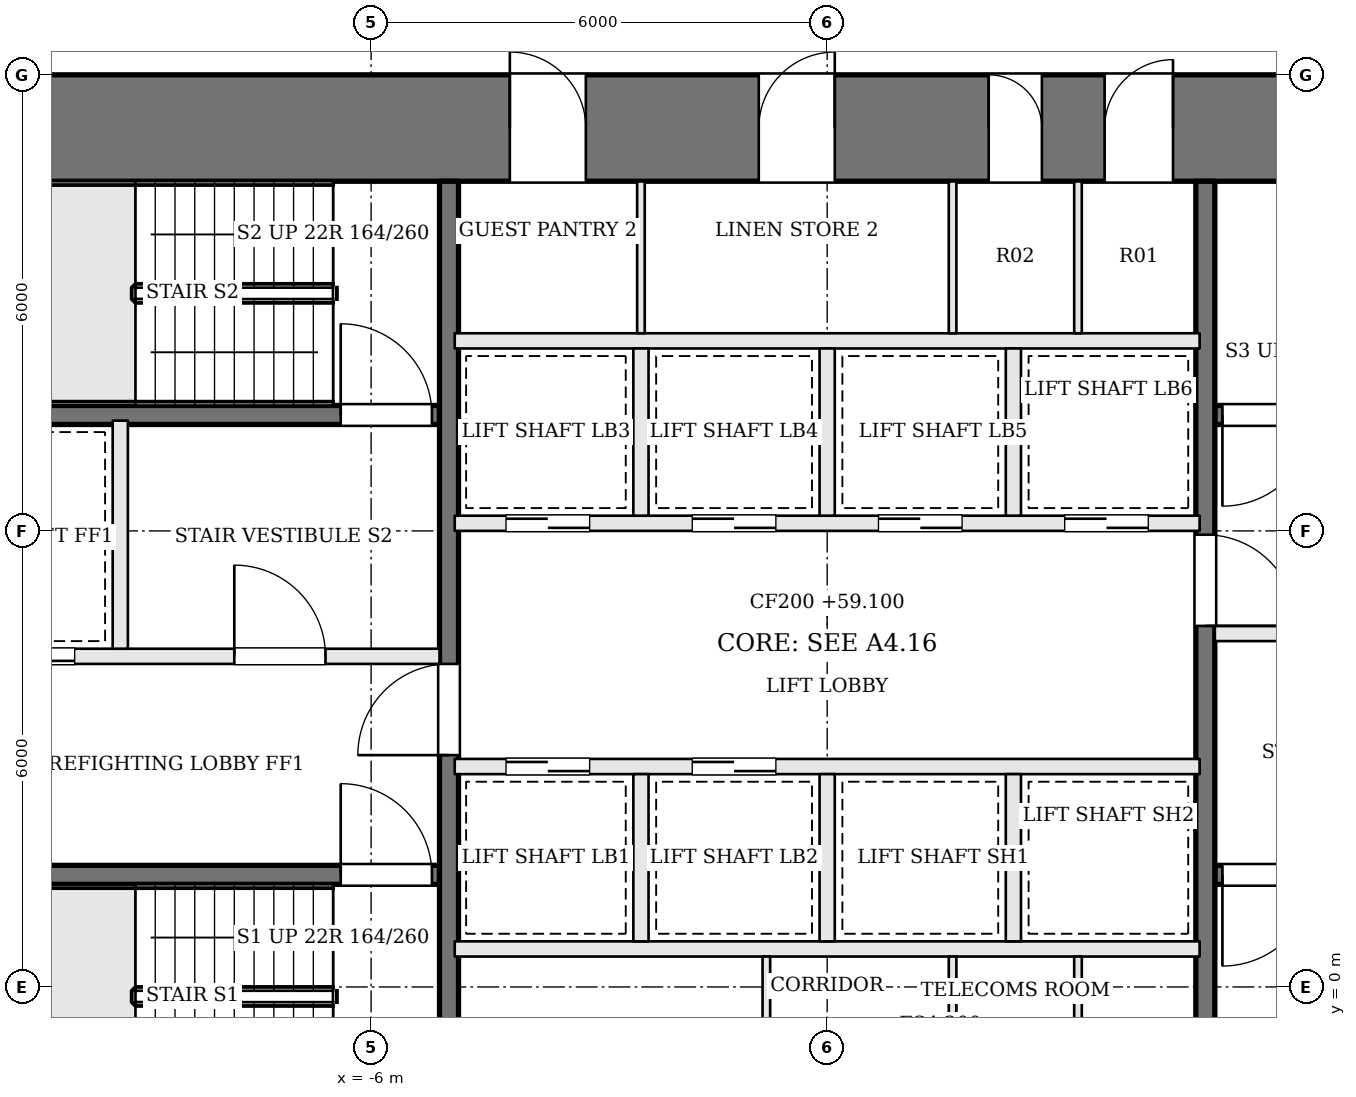
"""IFC4 building model, lengths in metres.
Left out: names, types, materials, properties, quantities, classifications, styles, units other than length and angle.
Written with IfcOpenShell. Run it as: python <this file> out.ifc"""

import sys

from ifc_helpers import new_model, si_unit, direction, frame, frame_2d, origin, place, context, subcontext, project, spatial, rectangle, extrude, element, fill, save


model = new_model("IFC4")
c1 = context("Model", 3, precision=1e-05, world=origin(), true_north=direction((0.0, 1.0)))
c2 = subcontext(c1, "Body", "Model", "MODEL_VIEW")
j1 = project(units=[si_unit("LENGTHUNIT", "METRE"), si_unit("PLANEANGLEUNIT", "RADIAN")], contexts=[c1])
p1 = place(None, origin())
s1 = spatial("IfcSite", under=j1, at=p1, CompositionType="ELEMENT")
p2 = place(p1, origin())
s2 = spatial("IfcBuilding", under=s1, at=p2, CompositionType="ELEMENT")
p3 = place(p2, frame((0.0, 0.0, 59.1)))
s3 = spatial("IfcBuildingStorey", under=s2, at=p3, CompositionType="ELEMENT", Elevation=59.1)
p4 = place(p3, frame((-13.0, 11.3, 0.0), z_axis=(0.0, 0.0, 1.0), x_axis=(1.0, 0.0, 0.0)))
e1 = element("IfcWall", 1, at=p4, inside=s3, PredefinedType="SHEAR", context=c2, shape_type="SweptSolid", body=[
    extrude(rectangle(XDim=26.0, YDim=1.4, at=frame_2d((13.0, 0.0))), origin(), (0.0, 0.0, 1.0), 3.6),
])
p5 = place(p4, frame((8.825, 0.0, 0.0)))
e2 = element("IfcOpeningElement", 2, at=p5, cuts=e1, PredefinedType="OPENING", context=c2, shape_type="SweptSolid", body=[
    extrude(rectangle(XDim=1.0, YDim=2.1, at=frame_2d((0.5, 1.05))), frame((0.0, 0.71, 0.0), z_axis=(0.0, -1.0, 0.0), x_axis=(1.0, 0.0, 0.0)), (0.0, 0.0, 1.0), 1.42),
])
p6 = place(p4, frame((12.1, 0.0, 0.0)))
e3 = element("IfcOpeningElement", 3, at=p6, cuts=e1, PredefinedType="OPENING", context=c2, shape_type="SweptSolid", body=[
    extrude(rectangle(XDim=1.0, YDim=2.1, at=frame_2d((0.5, 1.05))), frame((0.0, 0.71, 0.0), z_axis=(0.0, -1.0, 0.0), x_axis=(1.0, 0.0, 0.0)), (0.0, 0.0, 1.0), 1.42),
])
p7 = place(p4, frame((15.125, 0.0, 0.0)))
e4 = element("IfcOpeningElement", 4, at=p7, cuts=e1, PredefinedType="OPENING", context=c2, shape_type="SweptSolid", body=[
    extrude(rectangle(XDim=0.7, YDim=2.1, at=frame_2d((0.35, 1.05))), frame((0.0, 0.71, 0.0), z_axis=(0.0, -1.0, 0.0), x_axis=(1.0, 0.0, 0.0)), (0.0, 0.0, 1.0), 1.42),
])
p8 = place(p4, frame((16.65, 0.0, 0.0)))
e5 = element("IfcOpeningElement", 5, at=p8, cuts=e1, PredefinedType="OPENING", context=c2, shape_type="SweptSolid", body=[
    extrude(rectangle(XDim=0.9, YDim=2.1, at=frame_2d((0.45, 1.05))), frame((0.0, 0.71, 0.0), z_axis=(0.0, -1.0, 0.0), x_axis=(1.0, 0.0, 0.0)), (0.0, 0.0, 1.0), 1.42),
])
p9 = place(p3, frame((-11.6, 1.475, 0.0), z_axis=(0.0, 0.0, 1.0), x_axis=(1.0, 0.0, 0.0)))
e6 = element("IfcWall", 6, at=p9, inside=s3, PredefinedType="SOLIDWALL", context=c2, shape_type="SweptSolid", body=[
    extrude(rectangle(XDim=6.5, YDim=0.25, at=frame_2d((3.25, 0.0))), origin(), (0.0, 0.0, 1.0), 3.4),
])
p10 = place(p9, frame((5.2, 0.0, 0.0)))
e7 = element("IfcOpeningElement", 7, at=p10, cuts=e6, PredefinedType="OPENING", context=c2, shape_type="SweptSolid", body=[
    extrude(rectangle(XDim=1.2, YDim=2.1, at=frame_2d((0.6, 1.05))), frame((0.0, 0.135, 0.0), z_axis=(0.0, -1.0, 0.0), x_axis=(1.0, 0.0, 0.0)), (0.0, 0.0, 1.0), 0.27),
])
p11 = place(p3, frame((11.6, 7.525, 0.0), z_axis=(0.0, 0.0, 1.0), x_axis=(-1.0, 0.0, 0.0)))
e8 = element("IfcWall", 8, at=p11, inside=s3, PredefinedType="SOLIDWALL", context=c2, shape_type="SweptSolid", body=[
    extrude(rectangle(XDim=6.5, YDim=0.25, at=frame_2d((3.25, 0.0))), origin(), (0.0, 0.0, 1.0), 3.4),
])
p12 = place(p11, frame((5.2, 0.0, 0.0)))
e9 = element("IfcOpeningElement", 9, at=p12, cuts=e8, PredefinedType="OPENING", context=c2, shape_type="SweptSolid", body=[
    extrude(rectangle(XDim=1.2, YDim=2.1, at=frame_2d((0.6, 1.05))), frame((0.0, 0.135, 0.0), z_axis=(0.0, -1.0, 0.0), x_axis=(1.0, 0.0, 0.0)), (0.0, 0.0, 1.0), 0.27),
])
p13 = place(p3, frame((-11.6, 4.35, 0.0), z_axis=(0.0, 0.0, 1.0), x_axis=(1.0, 0.0, 0.0)))
e10 = element("IfcWall", 10, at=p13, inside=s3, PredefinedType="SOLIDWALL", context=c2, shape_type="SweptSolid", body=[
    extrude(rectangle(XDim=6.5, YDim=0.2, at=frame_2d((3.25, 0.0))), origin(), (0.0, 0.0, 1.0), 3.4),
])
p14 = place(p13, frame((3.8, 0.0, 0.0)))
e11 = element("IfcOpeningElement", 11, at=p14, cuts=e10, PredefinedType="OPENING", context=c2, shape_type="SweptSolid", body=[
    extrude(rectangle(XDim=1.2, YDim=2.1, at=frame_2d((0.6, 1.05))), frame((0.0, 0.11, 0.0), z_axis=(0.0, -1.0, 0.0), x_axis=(1.0, 0.0, 0.0)), (0.0, 0.0, 1.0), 0.22),
])
p15 = place(p13, frame((0.5, 0.0, 0.0)))
e12 = element("IfcOpeningElement", 12, at=p15, cuts=e10, PredefinedType="OPENING", context=c2, shape_type="SweptSolid", body=[
    extrude(rectangle(XDim=1.2, YDim=2.1, at=frame_2d((0.6, 1.05))), frame((0.0, 0.11, 0.0), z_axis=(0.0, -1.0, 0.0), x_axis=(1.0, 0.0, 0.0)), (0.0, 0.0, 1.0), 0.22),
])
p16 = place(p3, frame((11.6, 4.65, 0.0), z_axis=(0.0, 0.0, 1.0), x_axis=(-1.0, 0.0, 0.0)))
e13 = element("IfcWall", 13, at=p16, inside=s3, PredefinedType="SOLIDWALL", context=c2, shape_type="SweptSolid", body=[
    extrude(rectangle(XDim=6.5, YDim=0.2, at=frame_2d((3.25, 0.0))), origin(), (0.0, 0.0, 1.0), 3.4),
])
p17 = place(p16, frame((3.8, 0.0, 0.0)))
e14 = element("IfcOpeningElement", 14, at=p17, cuts=e13, PredefinedType="OPENING", context=c2, shape_type="SweptSolid", body=[
    extrude(rectangle(XDim=1.2, YDim=2.1, at=frame_2d((0.6, 1.05))), frame((0.0, 0.11, 0.0), z_axis=(0.0, -1.0, 0.0), x_axis=(1.0, 0.0, 0.0)), (0.0, 0.0, 1.0), 0.22),
])
p18 = place(p16, frame((0.5, 0.0, 0.0)))
e15 = element("IfcOpeningElement", 15, at=p18, cuts=e13, PredefinedType="OPENING", context=c2, shape_type="SweptSolid", body=[
    extrude(rectangle(XDim=1.2, YDim=2.1, at=frame_2d((0.6, 1.05))), frame((0.0, 0.11, 0.0), z_axis=(0.0, -1.0, 0.0), x_axis=(1.0, 0.0, 0.0)), (0.0, 0.0, 1.0), 0.22),
])
p19 = place(p3, frame((-11.6, 7.525, 0.0), z_axis=(0.0, 0.0, 1.0), x_axis=(1.0, 0.0, 0.0)))
e16 = element("IfcWall", 16, at=p19, inside=s3, PredefinedType="SOLIDWALL", context=c2, shape_type="SweptSolid", body=[
    extrude(rectangle(XDim=6.5, YDim=0.25, at=frame_2d((3.25, 0.0))), origin(), (0.0, 0.0, 1.0), 3.4),
])
p20 = place(p19, frame((5.2, 0.0, 0.0)))
e17 = element("IfcOpeningElement", 17, at=p20, cuts=e16, PredefinedType="OPENING", context=c2, shape_type="SweptSolid", body=[
    extrude(rectangle(XDim=1.2, YDim=2.1, at=frame_2d((0.6, 1.05))), frame((0.0, 0.135, 0.0), z_axis=(0.0, -1.0, 0.0), x_axis=(1.0, 0.0, 0.0)), (0.0, 0.0, 1.0), 0.27),
])
p21 = place(p3, frame((11.6, 1.475, 0.0), z_axis=(0.0, 0.0, 1.0), x_axis=(-1.0, 0.0, 0.0)))
e18 = element("IfcWall", 18, at=p21, inside=s3, PredefinedType="SOLIDWALL", context=c2, shape_type="SweptSolid", body=[
    extrude(rectangle(XDim=6.5, YDim=0.25, at=frame_2d((3.25, 0.0))), origin(), (0.0, 0.0, 1.0), 3.4),
])
p22 = place(p21, frame((5.2, 0.0, 0.0)))
e19 = element("IfcOpeningElement", 19, at=p22, cuts=e18, PredefinedType="OPENING", context=c2, shape_type="SweptSolid", body=[
    extrude(rectangle(XDim=1.2, YDim=2.1, at=frame_2d((0.6, 1.05))), frame((0.0, 0.135, 0.0), z_axis=(0.0, -1.0, 0.0), x_axis=(1.0, 0.0, 0.0)), (0.0, 0.0, 1.0), 0.27),
])
p23 = place(p3, frame((-9.3, 4.45, 0.0), z_axis=(0.0, 0.0, 1.0), x_axis=(0.0, 1.0, 0.0)))
e20 = element("IfcWall", 20, at=p23, inside=s3, PredefinedType="SOLIDWALL", context=c2, shape_type="SweptSolid", body=[
    extrude(rectangle(XDim=3.0, YDim=0.2, at=frame_2d((1.5, 0.0))), origin(), (0.0, 0.0, 1.0), 3.4),
])
p24 = place(p3, frame((-4.975, -1.6, 0.0), z_axis=(0.0, 0.0, 1.0), x_axis=(0.0, 1.0, 0.0)))
e21 = element("IfcWall", 21, at=p24, inside=s3, PredefinedType="SOLIDWALL", context=c2, shape_type="SweptSolid", body=[
    extrude(rectangle(XDim=12.2, YDim=0.25, at=frame_2d((6.1, 0.0))), origin(), (0.0, 0.0, 1.0), 3.4),
])
p25 = place(p24, frame((4.65, 0.0, 0.0)))
e22 = element("IfcOpeningElement", 22, at=p25, cuts=e21, PredefinedType="OPENING", context=c2, shape_type="SweptSolid", body=[
    extrude(rectangle(XDim=1.2, YDim=2.1, at=frame_2d((0.6, 1.05))), frame((0.0, 0.135, 0.0), z_axis=(0.0, -1.0, 0.0), x_axis=(1.0, 0.0, 0.0)), (0.0, 0.0, 1.0), 0.27),
])
p26 = place(p3, frame((4.975, 10.6, 0.0), z_axis=(0.0, 0.0, 1.0), x_axis=(0.0, -1.0, 0.0)))
e23 = element("IfcWall", 23, at=p26, inside=s3, PredefinedType="SOLIDWALL", context=c2, shape_type="SweptSolid", body=[
    extrude(rectangle(XDim=12.2, YDim=0.25, at=frame_2d((6.1, 0.0))), origin(), (0.0, 0.0, 1.0), 3.4),
])
p27 = place(p26, frame((4.65, 0.0, 0.0)))
e24 = element("IfcOpeningElement", 24, at=p27, cuts=e23, PredefinedType="OPENING", context=c2, shape_type="SweptSolid", body=[
    extrude(rectangle(XDim=1.2, YDim=2.1, at=frame_2d((0.6, 1.05))), frame((0.0, 0.135, 0.0), z_axis=(0.0, -1.0, 0.0), x_axis=(1.0, 0.0, 0.0)), (0.0, 0.0, 1.0), 0.27),
])
p28 = place(p3, frame((-4.9, 0.5, 0.0), z_axis=(0.0, 0.0, 1.0), x_axis=(1.0, 0.0, 0.0)))
e25 = element("IfcWall", 25, at=p28, inside=s3, PredefinedType="SOLIDWALL", context=c2, shape_type="SweptSolid", body=[
    extrude(rectangle(XDim=9.8, YDim=0.2, at=frame_2d((4.9, 0.0))), origin(), (0.0, 0.0, 1.0), 3.4),
])
p29 = place(p3, frame((-4.9, 2.9, 0.0), z_axis=(0.0, 0.0, 1.0), x_axis=(1.0, 0.0, 0.0)))
e26 = element("IfcWall", 26, at=p29, inside=s3, PredefinedType="SOLIDWALL", context=c2, shape_type="SweptSolid", body=[
    extrude(rectangle(XDim=9.8, YDim=0.2, at=frame_2d((4.9, 0.0))), origin(), (0.0, 0.0, 1.0), 3.4),
])
p30 = place(p29, frame((0.675, 0.0, 0.0)))
e27 = element("IfcOpeningElement", 27, at=p30, cuts=e26, PredefinedType="OPENING", context=c2, shape_type="SweptSolid", body=[
    extrude(rectangle(XDim=1.1, YDim=2.1, at=frame_2d((0.55, 1.05))), frame((0.0, 0.11, 0.0), z_axis=(0.0, -1.0, 0.0), x_axis=(1.0, 0.0, 0.0)), (0.0, 0.0, 1.0), 0.22),
])
p31 = place(p29, frame((3.125, 0.0, 0.0)))
e28 = element("IfcOpeningElement", 28, at=p31, cuts=e26, PredefinedType="OPENING", context=c2, shape_type="SweptSolid", body=[
    extrude(rectangle(XDim=1.1, YDim=2.1, at=frame_2d((0.55, 1.05))), frame((0.0, 0.11, 0.0), z_axis=(0.0, -1.0, 0.0), x_axis=(1.0, 0.0, 0.0)), (0.0, 0.0, 1.0), 0.22),
])
p32 = place(p3, frame((-4.9, 6.1, 0.0), z_axis=(0.0, 0.0, 1.0), x_axis=(1.0, 0.0, 0.0)))
e29 = element("IfcWall", 29, at=p32, inside=s3, PredefinedType="SOLIDWALL", context=c2, shape_type="SweptSolid", body=[
    extrude(rectangle(XDim=9.8, YDim=0.2, at=frame_2d((4.9, 0.0))), origin(), (0.0, 0.0, 1.0), 3.4),
])
p33 = place(p32, frame((0.675, 0.0, 0.0)))
e30 = element("IfcOpeningElement", 30, at=p33, cuts=e29, PredefinedType="OPENING", context=c2, shape_type="SweptSolid", body=[
    extrude(rectangle(XDim=1.1, YDim=2.1, at=frame_2d((0.55, 1.05))), frame((0.0, 0.11, 0.0), z_axis=(0.0, -1.0, 0.0), x_axis=(1.0, 0.0, 0.0)), (0.0, 0.0, 1.0), 0.22),
])
p34 = place(p32, frame((3.125, 0.0, 0.0)))
e31 = element("IfcOpeningElement", 31, at=p34, cuts=e29, PredefinedType="OPENING", context=c2, shape_type="SweptSolid", body=[
    extrude(rectangle(XDim=1.1, YDim=2.1, at=frame_2d((0.55, 1.05))), frame((0.0, 0.11, 0.0), z_axis=(0.0, -1.0, 0.0), x_axis=(1.0, 0.0, 0.0)), (0.0, 0.0, 1.0), 0.22),
])
p35 = place(p32, frame((5.575, 0.0, 0.0)))
e32 = element("IfcOpeningElement", 32, at=p35, cuts=e29, PredefinedType="OPENING", context=c2, shape_type="SweptSolid", body=[
    extrude(rectangle(XDim=1.1, YDim=2.1, at=frame_2d((0.55, 1.05))), frame((0.0, 0.11, 0.0), z_axis=(0.0, -1.0, 0.0), x_axis=(1.0, 0.0, 0.0)), (0.0, 0.0, 1.0), 0.22),
])
p36 = place(p32, frame((8.025, 0.0, 0.0)))
e33 = element("IfcOpeningElement", 33, at=p36, cuts=e29, PredefinedType="OPENING", context=c2, shape_type="SweptSolid", body=[
    extrude(rectangle(XDim=1.1, YDim=2.1, at=frame_2d((0.55, 1.05))), frame((0.0, 0.11, 0.0), z_axis=(0.0, -1.0, 0.0), x_axis=(1.0, 0.0, 0.0)), (0.0, 0.0, 1.0), 0.22),
])
p37 = place(p3, frame((-4.9, 8.5, 0.0), z_axis=(0.0, 0.0, 1.0), x_axis=(1.0, 0.0, 0.0)))
e34 = element("IfcWall", 34, at=p37, inside=s3, PredefinedType="SOLIDWALL", context=c2, shape_type="SweptSolid", body=[
    extrude(rectangle(XDim=9.8, YDim=0.2, at=frame_2d((4.9, 0.0))), origin(), (0.0, 0.0, 1.0), 3.4),
])
for number, where, z_axis, x_axis in (
    (35, (-2.45, 0.6, 0.0), (0.0, 0.0, 1.0), (0.0, 1.0, 0.0)),
    (36, (0.0, 0.6, 0.0), (0.0, 0.0, 1.0), (0.0, 1.0, 0.0)),
    (37, (2.45, 0.6, 0.0), (0.0, 0.0, 1.0), (0.0, 1.0, 0.0)),
    (38, (-2.45, 6.2, 0.0), (0.0, 0.0, 1.0), (0.0, 1.0, 0.0)),
    (39, (0.0, 6.2, 0.0), (0.0, 0.0, 1.0), (0.0, 1.0, 0.0)),
    (40, (2.45, 6.2, 0.0), (0.0, 0.0, 1.0), (0.0, 1.0, 0.0)),
):
    element("IfcWall", number, at=place(p3, frame(where, z_axis=z_axis, x_axis=x_axis)), inside=s3, PredefinedType="SOLIDWALL", context=c2, shape_type="SweptSolid", body=[
        extrude(rectangle(XDim=2.2, YDim=0.2, at=frame_2d((1.1, 0.0))), origin(), (0.0, 0.0, 1.0), 3.4),
    ])
for number, where, z_axis, x_axis in (
    (41, (-0.8, -1.6, 0.0), (0.0, 0.0, 1.0), (0.0, 1.0, 0.0)),
    (42, (1.65, -1.6, 0.0), (0.0, 0.0, 1.0), (0.0, 1.0, 0.0)),
    (43, (3.3, -1.6, 0.0), (0.0, 0.0, 1.0), (0.0, 1.0, 0.0)),
    (44, (-2.45, 8.6, 0.0), (0.0, 0.0, 1.0), (0.0, 1.0, 0.0)),
    (45, (1.65, 8.6, 0.0), (0.0, 0.0, 1.0), (0.0, 1.0, 0.0)),
    (46, (3.3, 8.6, 0.0), (0.0, 0.0, 1.0), (0.0, 1.0, 0.0)),
):
    element("IfcWall", number, at=place(p3, frame(where, z_axis=z_axis, x_axis=x_axis)), inside=s3, PredefinedType="PARTITIONING", context=c2, shape_type="SweptSolid", body=[
        extrude(rectangle(XDim=2.0, YDim=0.1, at=frame_2d((1.0, 0.0))), origin(), (0.0, 0.0, 1.0), 3.4),
    ])
p38 = place(p25, origin())
e47 = element("IfcDoor", 47, at=p38, inside=s3, OperationType="SINGLE_SWING_LEFT", PredefinedType="DOOR", context=c2, shape_type="SweptSolid", body=[
    extrude(rectangle(XDim=1.2, YDim=2.1, at=frame_2d((0.6, 1.05))), frame((0.0, 0.025, 0.0), z_axis=(0.0, -1.0, 0.0), x_axis=(1.0, 0.0, 0.0)), (0.0, 0.0, 1.0), 0.05),
])
fill(e22, e47)
p39 = place(p27, origin())
e48 = element("IfcDoor", 48, at=p39, inside=s3, OperationType="SINGLE_SWING_RIGHT", PredefinedType="DOOR", context=c2, shape_type="SweptSolid", body=[
    extrude(rectangle(XDim=1.2, YDim=2.1, at=frame_2d((0.6, 1.05))), frame((0.0, 0.025, 0.0), z_axis=(0.0, -1.0, 0.0), x_axis=(1.0, 0.0, 0.0)), (0.0, 0.0, 1.0), 0.05),
])
fill(e24, e48)
p40 = place(p14, origin())
e49 = element("IfcDoor", 49, at=p40, inside=s3, OperationType="SINGLE_SWING_LEFT", PredefinedType="DOOR", context=c2, shape_type="SweptSolid", body=[
    extrude(rectangle(XDim=1.2, YDim=2.1, at=frame_2d((0.6, 1.05))), frame((0.0, 0.025, 0.0), z_axis=(0.0, -1.0, 0.0), x_axis=(1.0, 0.0, 0.0)), (0.0, 0.0, 1.0), 0.05),
])
fill(e11, e49)
p41 = place(p10, origin())
e50 = element("IfcDoor", 50, at=p41, inside=s3, OperationType="SINGLE_SWING_LEFT", PredefinedType="DOOR", context=c2, shape_type="SweptSolid", body=[
    extrude(rectangle(XDim=1.2, YDim=2.1, at=frame_2d((0.6, 1.05))), frame((0.0, 0.025, 0.0), z_axis=(0.0, -1.0, 0.0), x_axis=(1.0, 0.0, 0.0)), (0.0, 0.0, 1.0), 0.05),
])
fill(e7, e50)
p42 = place(p12, origin())
e51 = element("IfcDoor", 51, at=p42, inside=s3, OperationType="SINGLE_SWING_RIGHT", PredefinedType="DOOR", context=c2, shape_type="SweptSolid", body=[
    extrude(rectangle(XDim=1.2, YDim=2.1, at=frame_2d((0.6, 1.05))), frame((0.0, 0.025, 0.0), z_axis=(0.0, -1.0, 0.0), x_axis=(1.0, 0.0, 0.0)), (0.0, 0.0, 1.0), 0.05),
])
fill(e9, e51)
p43 = place(p20, origin())
e52 = element("IfcDoor", 52, at=p43, inside=s3, OperationType="SINGLE_SWING_LEFT", PredefinedType="DOOR", context=c2, shape_type="SweptSolid", body=[
    extrude(rectangle(XDim=1.2, YDim=2.1, at=frame_2d((0.6, 1.05))), frame((0.0, 0.025, 0.0), z_axis=(0.0, -1.0, 0.0), x_axis=(1.0, 0.0, 0.0)), (0.0, 0.0, 1.0), 0.05),
])
fill(e17, e52)
p44 = place(p22, origin())
e53 = element("IfcDoor", 53, at=p44, inside=s3, OperationType="SINGLE_SWING_RIGHT", PredefinedType="DOOR", context=c2, shape_type="SweptSolid", body=[
    extrude(rectangle(XDim=1.2, YDim=2.1, at=frame_2d((0.6, 1.05))), frame((0.0, 0.025, 0.0), z_axis=(0.0, -1.0, 0.0), x_axis=(1.0, 0.0, 0.0)), (0.0, 0.0, 1.0), 0.05),
])
fill(e19, e53)
p45 = place(p15, origin())
e54 = element("IfcDoor", 54, at=p45, inside=s3, OperationType="SLIDING_TO_RIGHT", PredefinedType="DOOR", context=c2, shape_type="SweptSolid", body=[
    extrude(rectangle(XDim=1.2, YDim=2.1, at=frame_2d((0.6, 1.05))), frame((0.0, 0.025, 0.0), z_axis=(0.0, -1.0, 0.0), x_axis=(1.0, 0.0, 0.0)), (0.0, 0.0, 1.0), 0.05),
])
fill(e12, e54)
p46 = place(p30, origin())
e55 = element("IfcDoor", 55, at=p46, inside=s3, OperationType="SLIDING_TO_RIGHT", PredefinedType="DOOR", context=c2, shape_type="SweptSolid", body=[
    extrude(rectangle(XDim=1.1, YDim=2.1, at=frame_2d((0.55, 1.05))), frame((0.0, 0.025, 0.0), z_axis=(0.0, -1.0, 0.0), x_axis=(1.0, 0.0, 0.0)), (0.0, 0.0, 1.0), 0.05),
])
fill(e27, e55)
p47 = place(p31, origin())
e56 = element("IfcDoor", 56, at=p47, inside=s3, OperationType="SLIDING_TO_LEFT", PredefinedType="DOOR", context=c2, shape_type="SweptSolid", body=[
    extrude(rectangle(XDim=1.1, YDim=2.1, at=frame_2d((0.55, 1.05))), frame((0.0, 0.025, 0.0), z_axis=(0.0, -1.0, 0.0), x_axis=(1.0, 0.0, 0.0)), (0.0, 0.0, 1.0), 0.05),
])
fill(e28, e56)
p48 = place(p33, origin())
e57 = element("IfcDoor", 57, at=p48, inside=s3, OperationType="SLIDING_TO_RIGHT", PredefinedType="DOOR", context=c2, shape_type="SweptSolid", body=[
    extrude(rectangle(XDim=1.1, YDim=2.1, at=frame_2d((0.55, 1.05))), frame((0.0, 0.025, 0.0), z_axis=(0.0, -1.0, 0.0), x_axis=(1.0, 0.0, 0.0)), (0.0, 0.0, 1.0), 0.05),
])
fill(e30, e57)
p49 = place(p34, origin())
e58 = element("IfcDoor", 58, at=p49, inside=s3, OperationType="SLIDING_TO_LEFT", PredefinedType="DOOR", context=c2, shape_type="SweptSolid", body=[
    extrude(rectangle(XDim=1.1, YDim=2.1, at=frame_2d((0.55, 1.05))), frame((0.0, 0.025, 0.0), z_axis=(0.0, -1.0, 0.0), x_axis=(1.0, 0.0, 0.0)), (0.0, 0.0, 1.0), 0.05),
])
fill(e31, e58)
p50 = place(p35, origin())
e59 = element("IfcDoor", 59, at=p50, inside=s3, OperationType="SLIDING_TO_RIGHT", PredefinedType="DOOR", context=c2, shape_type="SweptSolid", body=[
    extrude(rectangle(XDim=1.1, YDim=2.1, at=frame_2d((0.55, 1.05))), frame((0.0, 0.025, 0.0), z_axis=(0.0, -1.0, 0.0), x_axis=(1.0, 0.0, 0.0)), (0.0, 0.0, 1.0), 0.05),
])
fill(e32, e59)
p51 = place(p36, origin())
e60 = element("IfcDoor", 60, at=p51, inside=s3, OperationType="SLIDING_TO_LEFT", PredefinedType="DOOR", context=c2, shape_type="SweptSolid", body=[
    extrude(rectangle(XDim=1.1, YDim=2.1, at=frame_2d((0.55, 1.05))), frame((0.0, 0.025, 0.0), z_axis=(0.0, -1.0, 0.0), x_axis=(1.0, 0.0, 0.0)), (0.0, 0.0, 1.0), 0.05),
])
fill(e33, e60)
p52 = place(p5, origin())
e61 = element("IfcDoor", 61, at=p52, inside=s3, OperationType="SINGLE_SWING_LEFT", PredefinedType="DOOR", context=c2, shape_type="SweptSolid", body=[
    extrude(rectangle(XDim=1.0, YDim=2.1, at=frame_2d((0.5, 1.05))), frame((0.0, 0.025, 0.0), z_axis=(0.0, -1.0, 0.0), x_axis=(1.0, 0.0, 0.0)), (0.0, 0.0, 1.0), 0.05),
])
fill(e2, e61)
p53 = place(p6, origin())
e62 = element("IfcDoor", 62, at=p53, inside=s3, OperationType="SINGLE_SWING_RIGHT", PredefinedType="DOOR", context=c2, shape_type="SweptSolid", body=[
    extrude(rectangle(XDim=1.0, YDim=2.1, at=frame_2d((0.5, 1.05))), frame((0.0, 0.025, 0.0), z_axis=(0.0, -1.0, 0.0), x_axis=(1.0, 0.0, 0.0)), (0.0, 0.0, 1.0), 0.05),
])
fill(e3, e62)
p54 = place(p7, origin())
e63 = element("IfcDoor", 63, at=p54, inside=s3, OperationType="SINGLE_SWING_LEFT", PredefinedType="DOOR", context=c2, shape_type="SweptSolid", body=[
    extrude(rectangle(XDim=0.7, YDim=2.1, at=frame_2d((0.35, 1.05))), frame((0.0, 0.025, 0.0), z_axis=(0.0, -1.0, 0.0), x_axis=(1.0, 0.0, 0.0)), (0.0, 0.0, 1.0), 0.05),
])
fill(e4, e63)
p55 = place(p8, origin())
e64 = element("IfcDoor", 64, at=p55, inside=s3, OperationType="SINGLE_SWING_RIGHT", PredefinedType="DOOR", context=c2, shape_type="SweptSolid", body=[
    extrude(rectangle(XDim=0.9, YDim=2.1, at=frame_2d((0.45, 1.05))), frame((0.0, 0.025, 0.0), z_axis=(0.0, -1.0, 0.0), x_axis=(1.0, 0.0, 0.0)), (0.0, 0.0, 1.0), 0.05),
])
fill(e5, e64)
save(model, sys.argv[1])
